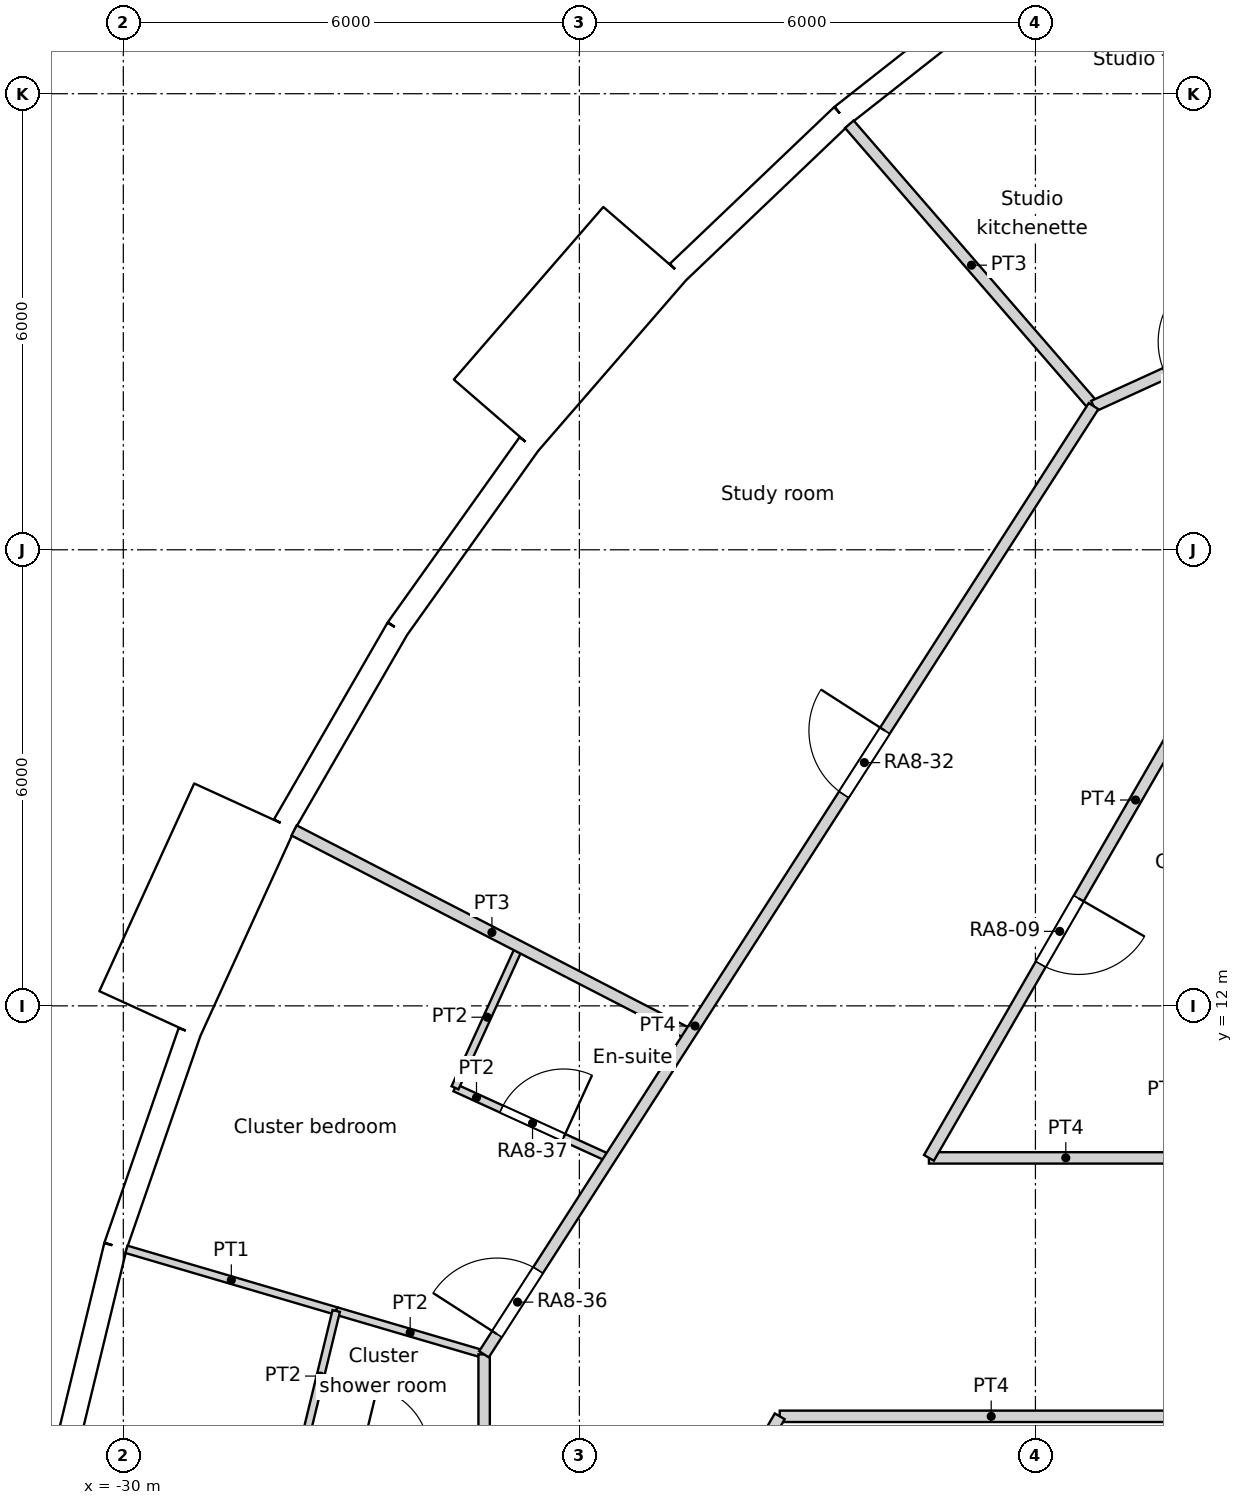
"""IFC4 building model, lengths in metres.
Left out: names, types, materials, properties, quantities, classifications, styles, units other than length and angle.
Written with IfcOpenShell. Run it as: python <this file> out.ifc"""

import sys

from ifc_helpers import new_model, si_unit, direction, frame, frame_2d, origin, origin_2d, place, context, subcontext, project, spatial, rectangle, circle, extrude, element, fill, save


model = new_model("IFC4")
c1 = context("Model", 3, precision=1e-05, world=origin(), true_north=direction((0.0, 1.0)))
c2 = subcontext(c1, "Body", "Model", "MODEL_VIEW")
j1 = project(units=[si_unit("LENGTHUNIT", "METRE"), si_unit("PLANEANGLEUNIT", "RADIAN")], contexts=[c1])
p1 = place(None, origin())
s1 = spatial("IfcSite", under=j1, at=p1, CompositionType="ELEMENT")
p2 = place(p1, origin())
s2 = spatial("IfcBuilding", under=s1, at=p2, CompositionType="ELEMENT")
p3 = place(p2, frame((0.0, 0.0, 103.8)))
s3 = spatial("IfcBuildingStorey", under=s2, at=p3, CompositionType="ELEMENT", Elevation=103.8)
for number, where, z_axis, x_axis in (
    (1, (-19.826, 22.88, 0.0), (0.0, 0.0, 1.0), (1.0, 0.0, 0.0)),
    (2, (-23.797, 18.715, 0.0), (0.0, 0.0, 1.0), (1.0, 0.0, 0.0)),
    (3, (-26.909, 13.873, 0.0), (0.0, 0.0, 1.0), (1.0, 0.0, 0.0)),
    (4, (-29.048, 8.529, 0.0), (0.0, 0.0, 1.0), (1.0, 0.0, 0.0)),
):
    element("IfcColumn", number, at=place(p3, frame(where, z_axis=z_axis, x_axis=x_axis)), inside=s3, PredefinedType="COLUMN", context=c2, shape_type="SweptSolid", body=[
        extrude(circle(Radius=0.6, at=origin_2d()), origin(), (0.0, 0.0, 1.0), 3.6),
    ])
for number, where, z_axis, x_axis in (
    (5, (-16.846, 17.855, 0.0), (0.0, 0.0, 1.0), (1.0, 0.0, 0.0)),
    (6, (-20.509, 13.489, 0.0), (0.0, 0.0, 1.0), (1.0, 0.0, 0.0)),
    (7, (-23.067, 8.396, 0.0), (0.0, 0.0, 1.0), (1.0, 0.0, 0.0)),
):
    element("IfcColumn", number, at=place(p3, frame(where, z_axis=z_axis, x_axis=x_axis)), inside=s3, PredefinedType="COLUMN", context=c2, shape_type="SweptSolid", body=[
        extrude(circle(Radius=0.65, at=origin_2d()), origin(), (0.0, 0.0, 1.0), 3.6),
    ])
p4 = place(p3, frame((-16.958, 8.167, 0.0), z_axis=(0.0, 0.0, 1.0), x_axis=(1.0, 0.0, 0.0)))
e8 = element("IfcColumn", 8, at=p4, inside=s3, PredefinedType="COLUMN", context=c2, shape_type="SweptSolid", body=[
    extrude(circle(Radius=0.7, at=origin_2d()), origin(), (0.0, 0.0, 1.0), 3.6),
])
p5 = place(p3, frame((-18.204, 25.553, 0.0), z_axis=(0.0, 0.0, 1.0), x_axis=(-0.786045331304, -0.618168858108, 0.0)))
e9 = element("IfcWall", 9, at=p5, inside=s3, PredefinedType="SOLIDWALL", context=c2, shape_type="SweptSolid", body=[
    extrude(rectangle(XDim=2.98, YDim=0.3, at=frame_2d((1.49, 0.0))), origin(), (0.0, 0.0, 1.0), 3.15),
])
p6 = place(p5, frame((1.49, 0.0, 1.55)))
e10 = element("IfcOpeningElement", 10, at=p6, cuts=e9, PredefinedType="OPENING", context=c2, shape_type="SweptSolid", body=[
    extrude(circle(Radius=0.9, at=origin_2d()), frame((0.0, 0.16, 0.0), z_axis=(0.0, -1.0, 0.0), x_axis=(1.0, 0.0, 0.0)), (0.0, 0.0, 1.0), 0.32),
])
p7 = place(p3, frame((-20.546, 23.711, 0.0), z_axis=(0.0, 0.0, 1.0), x_axis=(-0.723744206617, -0.690068346896, 0.0)))
e11 = element("IfcWall", 11, at=p7, inside=s3, PredefinedType="SOLIDWALL", context=c2, shape_type="SweptSolid", body=[
    extrude(rectangle(XDim=2.98, YDim=0.3, at=frame_2d((1.49, 0.0))), origin(), (0.0, 0.0, 1.0), 3.15),
])
p8 = place(p7, frame((1.49, 0.0, 1.55)))
e12 = element("IfcOpeningElement", 12, at=p8, cuts=e11, PredefinedType="OPENING", context=c2, shape_type="SweptSolid", body=[
    extrude(circle(Radius=0.9, at=origin_2d()), frame((0.0, 0.16, 0.0), z_axis=(0.0, -1.0, 0.0), x_axis=(1.0, 0.0, 0.0)), (0.0, 0.0, 1.0), 0.32),
])
p9 = place(p3, frame((-23.137, 22.033, -0.45), z_axis=(0.0, 0.0, 1.0), x_axis=(-0.654890259022, -0.75572398972, 0.0)))
e13 = element("IfcWall", 13, at=p9, inside=s3, PredefinedType="ELEMENTEDWALL", context=c2, shape_type="SweptSolid", body=[
    extrude(rectangle(XDim=3.0, YDim=1.45, at=frame_2d((1.5, 0.0))), origin(), (0.0, 0.0, 1.0), 3.6),
])
p10 = place(p9, frame((1.5, 0.0, 2.0)))
e14 = element("IfcOpeningElement", 14, at=p10, cuts=e13, PredefinedType="OPENING", context=c2, shape_type="SweptSolid", body=[
    extrude(circle(Radius=0.9, at=origin_2d()), frame((0.0, 0.735, 0.0), z_axis=(0.0, -1.0, 0.0), x_axis=(1.0, 0.0, 0.0)), (0.0, 0.0, 1.0), 1.47),
])
p11 = place(p3, frame((-24.666, 19.389, 0.0), z_axis=(0.0, 0.0, 1.0), x_axis=(-0.580059407678, -0.81457417315, 0.0)))
e15 = element("IfcWall", 15, at=p11, inside=s3, PredefinedType="SOLIDWALL", context=c2, shape_type="SweptSolid", body=[
    extrude(rectangle(XDim=2.979, YDim=0.3, at=frame_2d((1.49, 0.0))), origin(), (0.0, 0.0, 1.0), 3.15),
])
p12 = place(p11, frame((1.49, 0.0, 1.55)))
e16 = element("IfcOpeningElement", 16, at=p12, cuts=e15, PredefinedType="OPENING", context=c2, shape_type="SweptSolid", body=[
    extrude(circle(Radius=0.9, at=origin_2d()), frame((0.0, 0.16, 0.0), z_axis=(0.0, -1.0, 0.0), x_axis=(1.0, 0.0, 0.0)), (0.0, 0.0, 1.0), 0.32),
])
p13 = place(p3, frame((-26.394, 16.962, 0.0), z_axis=(0.0, 0.0, 1.0), x_axis=(-0.500025049464, -0.866010940986, 0.0)))
e17 = element("IfcWall", 17, at=p13, inside=s3, PredefinedType="SOLIDWALL", context=c2, shape_type="SweptSolid", body=[
    extrude(rectangle(XDim=2.98, YDim=0.3, at=frame_2d((1.49, 0.0))), origin(), (0.0, 0.0, 1.0), 3.15),
])
p14 = place(p13, frame((1.49, 0.0, 1.55)))
e18 = element("IfcOpeningElement", 18, at=p14, cuts=e17, PredefinedType="OPENING", context=c2, shape_type="SweptSolid", body=[
    extrude(circle(Radius=0.9, at=origin_2d()), frame((0.0, 0.16, 0.0), z_axis=(0.0, -1.0, 0.0), x_axis=(1.0, 0.0, 0.0)), (0.0, 0.0, 1.0), 0.32),
])
p15 = place(p3, frame((-28.407, 14.622, -0.45), z_axis=(0.0, 0.0, 1.0), x_axis=(-0.415427028395, -0.909626508012, 0.0)))
e19 = element("IfcWall", 19, at=p15, inside=s3, PredefinedType="ELEMENTEDWALL", context=c2, shape_type="SweptSolid", body=[
    extrude(rectangle(XDim=3.0, YDim=1.45, at=frame_2d((1.5, 0.0))), origin(), (0.0, 0.0, 1.0), 3.6),
])
p16 = place(p15, frame((1.5, 0.0, 2.0)))
e20 = element("IfcOpeningElement", 20, at=p16, cuts=e19, PredefinedType="OPENING", context=c2, shape_type="SweptSolid", body=[
    extrude(circle(Radius=0.9, at=origin_2d()), frame((0.0, 0.735, 0.0), z_axis=(0.0, -1.0, 0.0), x_axis=(1.0, 0.0, 0.0)), (0.0, 0.0, 1.0), 1.47),
])
p17 = place(p3, frame((-29.129, 11.655, 0.0), z_axis=(0.0, 0.0, 1.0), x_axis=(-0.327071167136, -0.944999709856, 0.0)))
e21 = element("IfcWall", 21, at=p17, inside=s3, PredefinedType="SOLIDWALL", context=c2, shape_type="SweptSolid", body=[
    extrude(rectangle(XDim=2.98, YDim=0.3, at=frame_2d((1.49, 0.0))), origin(), (0.0, 0.0, 1.0), 3.15),
])
p18 = place(p17, frame((1.49, 0.0, 1.55)))
e22 = element("IfcOpeningElement", 22, at=p18, cuts=e21, PredefinedType="OPENING", context=c2, shape_type="SweptSolid", body=[
    extrude(circle(Radius=0.9, at=origin_2d()), frame((0.0, 0.16, 0.0), z_axis=(0.0, -1.0, 0.0), x_axis=(1.0, 0.0, 0.0)), (0.0, 0.0, 1.0), 0.32),
])
p19 = place(p3, frame((-30.104, 8.839, 0.0), z_axis=(0.0, 0.0, 1.0), x_axis=(-0.235743081534, -0.971815414319, 0.0)))
e23 = element("IfcWall", 23, at=p19, inside=s3, PredefinedType="SOLIDWALL", context=c2, shape_type="SweptSolid", body=[
    extrude(rectangle(XDim=2.979, YDim=0.3, at=frame_2d((1.49, 0.0))), origin(), (0.0, 0.0, 1.0), 3.15),
])
p20 = place(p19, frame((1.49, 0.0, 1.55)))
e24 = element("IfcOpeningElement", 24, at=p20, cuts=e23, PredefinedType="OPENING", context=c2, shape_type="SweptSolid", body=[
    extrude(circle(Radius=0.9, at=origin_2d()), frame((0.0, 0.16, 0.0), z_axis=(0.0, -1.0, 0.0), x_axis=(1.0, 0.0, 0.0)), (0.0, 0.0, 1.0), 0.32),
])
p21 = place(p3, frame((-17.236, 19.891, 0.0), z_axis=(0.0, 0.0, 1.0), x_axis=(0.909645678785, 0.415385049163, 0.0)))
e25 = element("IfcWall", 25, at=p21, inside=s3, PredefinedType="PARTITIONING", context=c2, shape_type="SweptSolid", body=[
    extrude(rectangle(XDim=14.829, YDim=0.15, at=frame_2d((7.415, 0.0))), origin(), (0.0, 0.0, 1.0), 3.15),
])
p22 = place(p21, frame((11.569, 0.0, 0.0)))
e26 = element("IfcOpeningElement", 26, at=p22, cuts=e25, PredefinedType="OPENING", context=c2, shape_type="SweptSolid", body=[
    extrude(rectangle(XDim=1.0, YDim=2.1, at=frame_2d((0.5, 1.05))), frame((0.0, 0.075, 0.0), z_axis=(0.0, -1.0, 0.0), x_axis=(1.0, 0.0, 0.0)), (0.0, 0.0, 1.0), 0.15),
])
p23 = place(p21, frame((1.034, 0.0, 0.0)))
e27 = element("IfcOpeningElement", 27, at=p23, cuts=e25, PredefinedType="OPENING", context=c2, shape_type="SweptSolid", body=[
    extrude(rectangle(XDim=1.0, YDim=2.1, at=frame_2d((0.5, 1.05))), frame((0.0, 0.075, 0.0), z_axis=(0.0, -1.0, 0.0), x_axis=(1.0, 0.0, 0.0)), (0.0, 0.0, 1.0), 0.15),
])
p24 = place(p3, frame((-25.255, 7.416, 0.0), z_axis=(0.0, 0.0, 1.0), x_axis=(0.540805851332, 0.841147449123, 0.0)))
e28 = element("IfcWall", 28, at=p24, inside=s3, PredefinedType="PARTITIONING", context=c2, shape_type="SweptSolid", body=[
    extrude(rectangle(XDim=14.829, YDim=0.15, at=frame_2d((7.415, 0.0))), origin(), (0.0, 0.0, 1.0), 3.15),
])
p25 = place(p24, frame((8.754, 0.0, 0.0)))
e29 = element("IfcOpeningElement", 29, at=p25, cuts=e28, PredefinedType="OPENING", context=c2, shape_type="SweptSolid", body=[
    extrude(rectangle(XDim=1.0, YDim=2.04, at=frame_2d((0.5, 1.02))), frame((0.0, 0.075, 0.0), z_axis=(0.0, -1.0, 0.0), x_axis=(1.0, 0.0, 0.0)), (0.0, 0.0, 1.0), 0.15),
])
p26 = place(p24, frame((0.316, 0.0, 0.0)))
e30 = element("IfcOpeningElement", 30, at=p26, cuts=e28, PredefinedType="OPENING", context=c2, shape_type="SweptSolid", body=[
    extrude(rectangle(XDim=1.0, YDim=2.1, at=frame_2d((0.5, 1.05))), frame((0.0, 0.075, 0.0), z_axis=(0.0, -1.0, 0.0), x_axis=(1.0, 0.0, 0.0)), (0.0, 0.0, 1.0), 0.15),
])
p27 = place(p3, frame((-21.364, 6.6, 0.0), z_axis=(0.0, 0.0, 1.0), x_axis=(1.0, 0.0, 0.0)))
e31 = element("IfcWall", 31, at=p27, inside=s3, PredefinedType="PARTITIONING", context=c2, shape_type="SweptSolid", body=[
    extrude(rectangle(XDim=5.564, YDim=0.15, at=frame_2d((2.782, 0.0))), origin(), (0.0, 0.0, 1.0), 3.15),
])
p28 = place(p3, frame((-21.802, 5.842, 0.0), z_axis=(0.0, 0.0, 1.0), x_axis=(0.500277597875, 0.865865073245, 0.0)))
e32 = element("IfcWall", 32, at=p28, inside=s3, PredefinedType="PARTITIONING", context=c2, shape_type="SweptSolid", body=[
    extrude(rectangle(XDim=0.875, YDim=0.15, at=frame_2d((0.438, 0.0))), origin(), (0.0, 0.0, 1.0), 3.15),
])
p29 = place(p3, frame((-19.401, 10.0, 0.0), z_axis=(0.0, 0.0, 1.0), x_axis=(0.499992689227, 0.86602962462, 0.0)))
e33 = element("IfcWall", 33, at=p29, inside=s3, PredefinedType="PARTITIONING", context=c2, shape_type="SweptSolid", body=[
    extrude(rectangle(XDim=6.882, YDim=0.15, at=frame_2d((3.441, 0.0))), origin(), (0.0, 0.0, 1.0), 3.15),
])
p30 = place(p29, frame((2.941, 0.0, 0.0)))
e34 = element("IfcOpeningElement", 34, at=p30, cuts=e33, PredefinedType="OPENING", context=c2, shape_type="SweptSolid", body=[
    extrude(rectangle(XDim=1.0, YDim=2.04, at=frame_2d((0.5, 1.02))), frame((0.0, 0.075, 0.0), z_axis=(0.0, -1.0, 0.0), x_axis=(1.0, 0.0, 0.0)), (0.0, 0.0, 1.0), 0.15),
])
p31 = place(p3, frame((-19.401, 10.0, 0.0), z_axis=(0.0, 0.0, 1.0), x_axis=(1.0, 0.0, 0.0)))
e35 = element("IfcWall", 35, at=p31, inside=s3, PredefinedType="PARTITIONING", context=c2, shape_type="SweptSolid", body=[
    extrude(rectangle(XDim=3.601, YDim=0.15, at=frame_2d((1.8, 0.0))), origin(), (0.0, 0.0, 1.0), 3.15),
])
p32 = place(p3, frame((-25.253, -7.415, 0.0), z_axis=(0.0, 0.0, 1.0), x_axis=(0.0, 1.0, 0.0)))
e36 = element("IfcWall", 36, at=p32, inside=s3, PredefinedType="PARTITIONING", context=c2, shape_type="SweptSolid", body=[
    extrude(rectangle(XDim=14.83, YDim=0.15, at=frame_2d((7.415, 0.0))), origin(), (0.0, 0.0, 1.0), 3.15),
])
p33 = place(p32, frame((11.17, 0.0, 0.0)))
e37 = element("IfcOpeningElement", 37, at=p33, cuts=e36, PredefinedType="OPENING", context=c2, shape_type="SweptSolid", body=[
    extrude(rectangle(XDim=1.1, YDim=2.1, at=frame_2d((0.55, 1.05))), frame((0.0, 0.075, 0.0), z_axis=(0.0, -1.0, 0.0), x_axis=(1.0, 0.0, 0.0)), (0.0, 0.0, 1.0), 0.15),
])
p34 = place(p32, frame((0.776, 0.0, 0.0)))
e38 = element("IfcOpeningElement", 38, at=p34, cuts=e36, PredefinedType="OPENING", context=c2, shape_type="SweptSolid", body=[
    extrude(rectangle(XDim=1.0, YDim=2.1, at=frame_2d((0.5, 1.05))), frame((0.0, 0.075, 0.0), z_axis=(0.0, -1.0, 0.0), x_axis=(1.0, 0.0, 0.0)), (0.0, 0.0, 1.0), 0.15),
])
p35 = place(p3, frame((-20.448, 23.598, 0.0), z_axis=(0.0, 0.0, 1.0), x_axis=(0.654953271538, -0.755669380153, 0.0)))
e39 = element("IfcWall", 39, at=p35, inside=s3, PredefinedType="PARTITIONING", context=c2, shape_type="SweptSolid", body=[
    extrude(rectangle(XDim=4.906, YDim=0.15, at=frame_2d((2.453, 0.0))), origin(), (0.0, 0.0, 1.0), 3.15),
])
p36 = place(p3, frame((-27.753, 14.308, 0.0), z_axis=(0.0, 0.0, 1.0), x_axis=(0.88877955153, -0.45833493079, 0.0)))
e40 = element("IfcWall", 40, at=p36, inside=s3, PredefinedType="PARTITIONING", context=c2, shape_type="SweptSolid", body=[
    extrude(rectangle(XDim=5.856, YDim=0.15, at=frame_2d((2.928, 0.0))), origin(), (0.0, 0.0, 1.0), 3.15),
])
p37 = place(p3, frame((-27.615, 6.273, 0.0), z_axis=(0.0, 0.0, 1.0), x_axis=(0.23598051436, 0.971757787127, 0.0)))
e41 = element("IfcWall", 41, at=p37, inside=s3, PredefinedType="PARTITIONING", context=c2, shape_type="SweptSolid", body=[
    extrude(rectangle(XDim=1.763, YDim=0.1, at=frame_2d((0.881, 0.0))), origin(), (0.0, 0.0, 1.0), 3.15),
])
p38 = place(p3, frame((-29.959, 8.797, 0.0), z_axis=(0.0, 0.0, 1.0), x_axis=(0.959434394536, -0.281931982189, 0.0)))
e42 = element("IfcWall", 42, at=p38, inside=s3, PredefinedType="PARTITIONING", context=c2, shape_type="SweptSolid", body=[
    extrude(rectangle(XDim=2.877, YDim=0.1, at=frame_2d((1.438, 0.0))), origin(), (0.0, 0.0, 1.0), 3.15),
])
p39 = place(p3, frame((-27.199, 7.986, 0.0), z_axis=(0.0, 0.0, 1.0), x_axis=(0.959541665722, -0.281566673708, 0.0)))
e43 = element("IfcWall", 43, at=p39, inside=s3, PredefinedType="PARTITIONING", context=c2, shape_type="SweptSolid", body=[
    extrude(rectangle(XDim=2.028, YDim=0.1, at=frame_2d((1.014, 0.0))), origin(), (0.0, 0.0, 1.0), 3.15),
])
p40 = place(p3, frame((-25.636, 10.922, 0.0), z_axis=(0.0, 0.0, 1.0), x_axis=(0.415361197493, 0.90965657015, 0.0)))
e44 = element("IfcWall", 44, at=p40, inside=s3, PredefinedType="PARTITIONING", context=c2, shape_type="SweptSolid", body=[
    extrude(rectangle(XDim=2.041, YDim=0.1, at=frame_2d((1.021, 0.0))), origin(), (0.0, 0.0, 1.0), 3.15),
])
p41 = place(p3, frame((-25.636, 10.922, 0.0), z_axis=(0.0, 0.0, 1.0), x_axis=(0.909641485443, -0.415394231978, 0.0)))
e45 = element("IfcWall", 45, at=p41, inside=s3, PredefinedType="PARTITIONING", context=c2, shape_type="SweptSolid", body=[
    extrude(rectangle(XDim=2.242, YDim=0.1, at=frame_2d((1.121, 0.0))), origin(), (0.0, 0.0, 1.0), 3.15),
])
p42 = place(p41, frame((0.671, 0.0, 0.0)))
e46 = element("IfcOpeningElement", 46, at=p42, cuts=e45, PredefinedType="OPENING", context=c2, shape_type="SweptSolid", body=[
    extrude(rectangle(XDim=0.9, YDim=2.04, at=frame_2d((0.45, 1.02))), frame((0.0, 0.05, 0.0), z_axis=(0.0, -1.0, 0.0), x_axis=(1.0, 0.0, 0.0)), (0.0, 0.0, 1.0), 0.1),
])
p43 = place(p6, origin())
e47 = element("IfcWindow", 47, at=p43, inside=s3, PartitioningType="SINGLE_PANEL", PredefinedType="WINDOW", context=c2, shape_type="SweptSolid", body=[
    extrude(circle(Radius=0.9, at=origin_2d()), frame((0.0, 0.12, 0.0), z_axis=(0.0, -1.0, 0.0), x_axis=(1.0, 0.0, 0.0)), (0.0, 0.0, 1.0), 0.1),
])
fill(e10, e47)
p44 = place(p8, origin())
e48 = element("IfcWindow", 48, at=p44, inside=s3, PartitioningType="SINGLE_PANEL", PredefinedType="WINDOW", context=c2, shape_type="SweptSolid", body=[
    extrude(circle(Radius=0.9, at=origin_2d()), frame((0.0, 0.12, 0.0), z_axis=(0.0, -1.0, 0.0), x_axis=(1.0, 0.0, 0.0)), (0.0, 0.0, 1.0), 0.1),
])
fill(e12, e48)
p45 = place(p10, origin())
e49 = element("IfcWindow", 49, at=p45, inside=s3, PartitioningType="SINGLE_PANEL", PredefinedType="WINDOW", context=c2, shape_type="SweptSolid", body=[
    extrude(circle(Radius=0.9, at=origin_2d()), frame((0.0, 0.695, 0.0), z_axis=(0.0, -1.0, 0.0), x_axis=(1.0, 0.0, 0.0)), (0.0, 0.0, 1.0), 0.1),
])
fill(e14, e49)
p46 = place(p12, origin())
e50 = element("IfcWindow", 50, at=p46, inside=s3, PartitioningType="SINGLE_PANEL", PredefinedType="WINDOW", context=c2, shape_type="SweptSolid", body=[
    extrude(circle(Radius=0.9, at=origin_2d()), frame((0.0, 0.12, 0.0), z_axis=(0.0, -1.0, 0.0), x_axis=(1.0, 0.0, 0.0)), (0.0, 0.0, 1.0), 0.1),
])
fill(e16, e50)
p47 = place(p14, origin())
e51 = element("IfcWindow", 51, at=p47, inside=s3, PartitioningType="SINGLE_PANEL", PredefinedType="WINDOW", context=c2, shape_type="SweptSolid", body=[
    extrude(circle(Radius=0.9, at=origin_2d()), frame((0.0, 0.12, 0.0), z_axis=(0.0, -1.0, 0.0), x_axis=(1.0, 0.0, 0.0)), (0.0, 0.0, 1.0), 0.1),
])
fill(e18, e51)
p48 = place(p16, origin())
e52 = element("IfcWindow", 52, at=p48, inside=s3, PartitioningType="SINGLE_PANEL", PredefinedType="WINDOW", context=c2, shape_type="SweptSolid", body=[
    extrude(circle(Radius=0.9, at=origin_2d()), frame((0.0, 0.695, 0.0), z_axis=(0.0, -1.0, 0.0), x_axis=(1.0, 0.0, 0.0)), (0.0, 0.0, 1.0), 0.1),
])
fill(e20, e52)
p49 = place(p18, origin())
e53 = element("IfcWindow", 53, at=p49, inside=s3, PartitioningType="SINGLE_PANEL", PredefinedType="WINDOW", context=c2, shape_type="SweptSolid", body=[
    extrude(circle(Radius=0.9, at=origin_2d()), frame((0.0, 0.12, 0.0), z_axis=(0.0, -1.0, 0.0), x_axis=(1.0, 0.0, 0.0)), (0.0, 0.0, 1.0), 0.1),
])
fill(e22, e53)
p50 = place(p20, origin())
e54 = element("IfcWindow", 54, at=p50, inside=s3, PartitioningType="SINGLE_PANEL", PredefinedType="WINDOW", context=c2, shape_type="SweptSolid", body=[
    extrude(circle(Radius=0.9, at=origin_2d()), frame((0.0, 0.12, 0.0), z_axis=(0.0, -1.0, 0.0), x_axis=(1.0, 0.0, 0.0)), (0.0, 0.0, 1.0), 0.1),
])
fill(e24, e54)
p51 = place(p30, origin())
e55 = element("IfcDoor", 55, at=p51, inside=s3, OperationType="SINGLE_SWING_LEFT", PredefinedType="DOOR", context=c2, shape_type="SweptSolid", body=[
    extrude(rectangle(XDim=1.0, YDim=2.04, at=frame_2d((0.5, 1.02))), frame((0.0, 0.025, 0.0), z_axis=(0.0, -1.0, 0.0), x_axis=(1.0, 0.0, 0.0)), (0.0, 0.0, 1.0), 0.05),
])
fill(e34, e55)
p52 = place(p25, origin())
e56 = element("IfcDoor", 56, at=p52, inside=s3, OperationType="SINGLE_SWING_RIGHT", PredefinedType="DOOR", context=c2, shape_type="SweptSolid", body=[
    extrude(rectangle(XDim=1.0, YDim=2.04, at=frame_2d((0.5, 1.02))), frame((0.0, 0.025, 0.0), z_axis=(0.0, -1.0, 0.0), x_axis=(1.0, 0.0, 0.0)), (0.0, 0.0, 1.0), 0.05),
])
fill(e29, e56)
p53 = place(p26, origin())
e57 = element("IfcDoor", 57, at=p53, inside=s3, OperationType="SINGLE_SWING_LEFT", PredefinedType="DOOR", context=c2, shape_type="SweptSolid", body=[
    extrude(rectangle(XDim=1.0, YDim=2.1, at=frame_2d((0.5, 1.05))), frame((0.0, 0.025, 0.0), z_axis=(0.0, -1.0, 0.0), x_axis=(1.0, 0.0, 0.0)), (0.0, 0.0, 1.0), 0.05),
])
fill(e30, e57)
p54 = place(p42, origin())
e58 = element("IfcDoor", 58, at=p54, inside=s3, OperationType="SINGLE_SWING_RIGHT", PredefinedType="DOOR", context=c2, shape_type="SweptSolid", body=[
    extrude(rectangle(XDim=0.9, YDim=2.04, at=frame_2d((0.45, 1.02))), frame((0.0, 0.025, 0.0), z_axis=(0.0, -1.0, 0.0), x_axis=(1.0, 0.0, 0.0)), (0.0, 0.0, 1.0), 0.05),
])
fill(e46, e58)
save(model, sys.argv[1])
